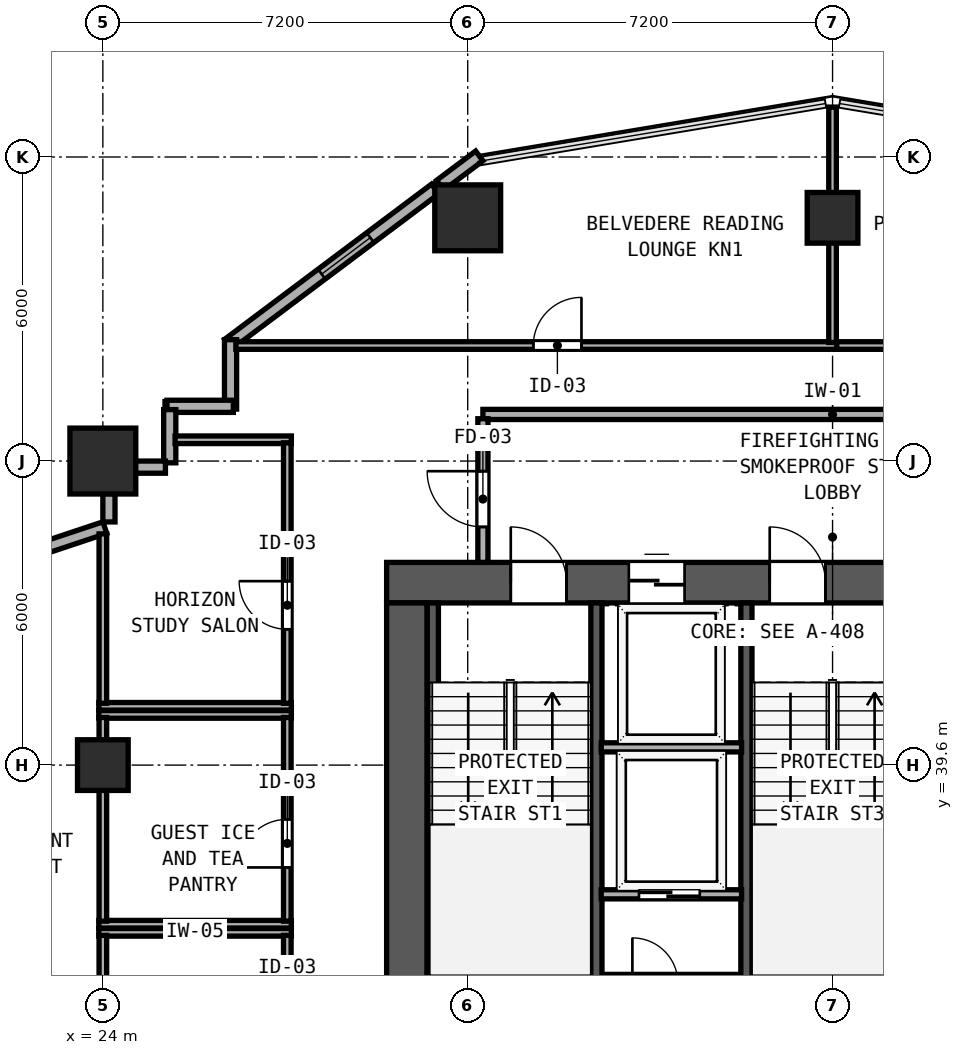
"""IFC4 building model, lengths in metres.
Left out: names, types, materials, properties, quantities, classifications, styles, units other than length and angle.
Written with IfcOpenShell. Run it as: python <this file> out.ifc"""

import sys

from ifc_helpers import new_model, si_unit, direction, frame, frame_2d, origin, origin_2d, place, context, subcontext, project, spatial, rectangle, hollow_rectangle, extrude, element, fill, save


model = new_model("IFC4")
c1 = context("Model", 3, precision=1e-05, world=origin(), true_north=direction((0.0, 1.0)))
c2 = subcontext(c1, "Body", "Model", "MODEL_VIEW")
j1 = project(units=[si_unit("LENGTHUNIT", "METRE"), si_unit("PLANEANGLEUNIT", "RADIAN")], contexts=[c1])
p1 = place(None, origin())
s1 = spatial("IfcSite", under=j1, at=p1, CompositionType="ELEMENT")
p2 = place(p1, origin())
s2 = spatial("IfcBuilding", under=s1, at=p2, CompositionType="ELEMENT")
p3 = place(p2, frame((0.0, 0.0, 31.6)))
s3 = spatial("IfcBuildingStorey", under=s2, at=p3, CompositionType="ELEMENT", Elevation=31.6)
p4 = place(p3, frame((29.6, 43.2, 0.0), z_axis=(0.0, 0.0, 1.0), x_axis=(1.0, 0.0, 0.0)))
e1 = element("IfcWall", 1, at=p4, inside=s3, PredefinedType="SHEAR", context=c2, shape_type="SweptSolid", body=[
    extrude(rectangle(XDim=17.6, YDim=0.8, at=frame_2d((8.8, 0.0))), origin(), (0.0, 0.0, 1.0), 3.6),
])
p5 = place(p4, frame((2.45, 0.0, 0.0)))
e2 = element("IfcOpeningElement", 2, at=p5, cuts=e1, PredefinedType="OPENING", context=c2, shape_type="SweptSolid", body=[
    extrude(rectangle(XDim=1.1, YDim=2.15, at=frame_2d((0.55, 1.075))), frame((0.0, 0.41, 0.0), z_axis=(0.0, -1.0, 0.0), x_axis=(1.0, 0.0, 0.0)), (0.0, 0.0, 1.0), 0.82),
])
p6 = place(p4, frame((7.56, 0.0, 0.0)))
e3 = element("IfcOpeningElement", 3, at=p6, cuts=e1, PredefinedType="OPENING", context=c2, shape_type="SweptSolid", body=[
    extrude(rectangle(XDim=1.1, YDim=2.15, at=frame_2d((0.55, 1.075))), frame((0.0, 0.41, 0.0), z_axis=(0.0, -1.0, 0.0), x_axis=(1.0, 0.0, 0.0)), (0.0, 0.0, 1.0), 0.82),
])
p7 = place(p4, frame((13.65, 0.0, 0.0)))
e4 = element("IfcOpeningElement", 4, at=p7, cuts=e1, PredefinedType="OPENING", context=c2, shape_type="SweptSolid", body=[
    extrude(rectangle(XDim=1.1, YDim=2.15, at=frame_2d((0.55, 1.075))), frame((0.0, 0.41, 0.0), z_axis=(0.0, -1.0, 0.0), x_axis=(1.0, 0.0, 0.0)), (0.0, 0.0, 1.0), 0.82),
])
p8 = place(p4, frame((4.78, 0.0, 0.0)))
e5 = element("IfcOpeningElement", 5, at=p8, cuts=e1, PredefinedType="OPENING", context=c2, shape_type="SweptSolid", body=[
    extrude(rectangle(XDim=1.1, YDim=2.2, at=frame_2d((0.55, 1.1))), frame((0.0, 0.41, 0.0), z_axis=(0.0, -1.0, 0.0), x_axis=(1.0, 0.0, 0.0)), (0.0, 0.0, 1.0), 0.82),
])
p9 = place(p4, frame((11.14, 0.0, 0.0)))
e6 = element("IfcOpeningElement", 6, at=p9, cuts=e1, PredefinedType="OPENING", context=c2, shape_type="SweptSolid", body=[
    extrude(rectangle(XDim=1.1, YDim=2.2, at=frame_2d((0.55, 1.1))), frame((0.0, 0.41, 0.0), z_axis=(0.0, -1.0, 0.0), x_axis=(1.0, 0.0, 0.0)), (0.0, 0.0, 1.0), 0.82),
])
p10 = place(p3, frame((30.0, 32.8, 0.0), z_axis=(0.0, 0.0, 1.0), x_axis=(0.0, 1.0, 0.0)))
e7 = element("IfcWall", 7, at=p10, inside=s3, PredefinedType="SHEAR", context=c2, shape_type="SweptSolid", body=[
    extrude(rectangle(XDim=10.0, YDim=0.8, at=frame_2d((5.0, 0.0))), origin(), (0.0, 0.0, 1.0), 3.6),
])
p11 = place(p3, frame((30.4, 35.29, 0.0), z_axis=(0.0, 0.0, 1.0), x_axis=(1.0, 0.0, 0.0)))
e8 = element("IfcWall", 8, at=p11, inside=s3, PredefinedType="SHEAR", context=c2, shape_type="SweptSolid", body=[
    extrude(rectangle(XDim=16.0, YDim=0.36, at=frame_2d((8.0, 0.0))), origin(), (0.0, 0.0, 1.0), 3.6),
])
p12 = place(p11, frame((4.95, 0.0, 0.0), z_axis=(0.0, 0.0, 1.0), x_axis=(-1.0, 0.0, 0.0)))
e9 = element("IfcOpeningElement", 9, at=p12, cuts=e8, PredefinedType="OPENING", context=c2, shape_type="SweptSolid", body=[
    extrude(rectangle(XDim=0.9, YDim=2.1, at=frame_2d((0.45, 1.05))), frame((0.0, 0.19, 0.0), z_axis=(0.0, -1.0, 0.0), x_axis=(1.0, 0.0, 0.0)), (0.0, 0.0, 1.0), 0.38),
])
p13 = place(p11, frame((12.01, 0.0, 0.0), z_axis=(0.0, 0.0, 1.0), x_axis=(-1.0, 0.0, 0.0)))
e10 = element("IfcOpeningElement", 10, at=p13, cuts=e8, PredefinedType="OPENING", context=c2, shape_type="SweptSolid", body=[
    extrude(rectangle(XDim=0.9, YDim=2.1, at=frame_2d((0.45, 1.05))), frame((0.0, 0.19, 0.0), z_axis=(0.0, -1.0, 0.0), x_axis=(1.0, 0.0, 0.0)), (0.0, 0.0, 1.0), 0.38),
])
for number, where, z_axis, x_axis in (
    (11, (30.512, 35.39, 0.0), (0.0, 0.0, 1.0), (0.0, 1.0, 0.0)),
    (12, (33.74, 35.39, 0.0), (0.0, 0.0, 1.0), (0.0, 1.0, 0.0)),
    (13, (36.7, 35.39, 0.0), (0.0, 0.0, 1.0), (0.0, 1.0, 0.0)),
):
    element("IfcWall", number, at=place(p3, frame(where, z_axis=z_axis, x_axis=x_axis)), inside=s3, PredefinedType="SHEAR", context=c2, shape_type="SweptSolid", body=[
        extrude(rectangle(XDim=7.41, YDim=0.22, at=frame_2d((3.705, 0.0))), origin(), (0.0, 0.0, 1.0), 3.6),
    ])
for number, where, z_axis, x_axis in (
    (14, (24.0, 45.6, 0.0), (0.0, 0.0, 1.0), (1.0, 0.0, 0.0)),
    (15, (31.2, 50.4, 0.0), (0.0, 0.0, 1.0), (1.0, 0.0, 0.0)),
):
    element("IfcColumn", number, at=place(p3, frame(where, z_axis=z_axis, x_axis=x_axis)), inside=s3, PredefinedType="COLUMN", context=c2, shape_type="SweptSolid", body=[
        extrude(hollow_rectangle(XDim=1.3, YDim=1.3, WallThickness=0.048, at=origin_2d()), origin(), (0.0, 0.0, 1.0), 3.8),
    ])
for number, where, z_axis, x_axis in (
    (16, (24.0, 39.6, 0.0), (0.0, 0.0, 1.0), (1.0, 0.0, 0.0)),
    (17, (38.4, 50.4, 0.0), (0.0, 0.0, 1.0), (1.0, 0.0, 0.0)),
):
    element("IfcColumn", number, at=place(p3, frame(where, z_axis=z_axis, x_axis=x_axis)), inside=s3, PredefinedType="COLUMN", context=c2, shape_type="SweptSolid", body=[
        extrude(hollow_rectangle(XDim=1.0, YDim=1.0, WallThickness=0.038, at=origin_2d()), origin(), (0.0, 0.0, 1.0), 3.8),
    ])
p14 = place(p3, frame((31.429, 51.621, 0.0), z_axis=(0.0, 0.0, 1.0), x_axis=(-0.800090996409, -0.599878652284, 0.0)))
e18 = element("IfcWall", 18, at=p14, inside=s3, PredefinedType="SOLIDWALL", context=c2, shape_type="SweptSolid", body=[
    extrude(rectangle(XDim=0.966, YDim=0.24, at=frame_2d((0.483, 0.0))), origin(), (0.0, 0.0, 1.0), 3.6),
])
p15 = place(p3, frame((30.558, 50.969, 0.0), z_axis=(0.0, 0.0, 1.0), x_axis=(-0.8, -0.6, 0.0)))
e19 = element("IfcWall", 19, at=p15, inside=s3, PredefinedType="SOLIDWALL", context=c2, shape_type="SweptSolid", body=[
    extrude(rectangle(XDim=5.103, YDim=0.24, at=frame_2d((2.551, 0.0))), origin(), (0.0, 0.0, 1.0), 3.6),
])
p16 = place(p15, frame((1.6, 0.0, 0.85)))
e20 = element("IfcOpeningElement", 20, at=p16, cuts=e19, PredefinedType="OPENING", context=c2, shape_type="SweptSolid", body=[
    extrude(rectangle(XDim=1.2, YDim=1.85, at=frame_2d((0.6, 0.925))), frame((0.0, 0.13, 0.0), z_axis=(0.0, -1.0, 0.0), x_axis=(1.0, 0.0, 0.0)), (0.0, 0.0, 1.0), 0.26),
])
p17 = place(p3, frame((26.52, 47.995, 0.0), z_axis=(0.0, 0.0, 1.0), x_axis=(0.0, -1.0, 0.0)))
e21 = element("IfcWall", 21, at=p17, inside=s3, PredefinedType="SOLIDWALL", context=c2, shape_type="SweptSolid", body=[
    extrude(rectangle(XDim=1.37, YDim=0.24, at=frame_2d((0.685, 0.0))), origin(), (0.0, 0.0, 1.0), 3.6),
])
p18 = place(p3, frame((26.575, 46.68, 0.0), z_axis=(0.0, 0.0, 1.0), x_axis=(-1.0, 0.0, 0.0)))
e22 = element("IfcWall", 22, at=p18, inside=s3, PredefinedType="SOLIDWALL", context=c2, shape_type="SweptSolid", body=[
    extrude(rectangle(XDim=1.31, YDim=0.24, at=frame_2d((0.655, 0.0))), origin(), (0.0, 0.0, 1.0), 3.6),
])
p19 = place(p3, frame((25.32, 46.615, 0.0), z_axis=(0.0, 0.0, 1.0), x_axis=(0.0, -1.0, 0.0)))
e23 = element("IfcWall", 23, at=p19, inside=s3, PredefinedType="SOLIDWALL", context=c2, shape_type="SweptSolid", body=[
    extrude(rectangle(XDim=1.05, YDim=0.24, at=frame_2d((0.525, 0.0))), origin(), (0.0, 0.0, 1.0), 3.6),
])
p20 = place(p3, frame((25.235, 45.48, 0.0), z_axis=(0.0, 0.0, 1.0), x_axis=(-1.0, 0.0, 0.0)))
e24 = element("IfcWall", 24, at=p20, inside=s3, PredefinedType="SOLIDWALL", context=c2, shape_type="SweptSolid", body=[
    extrude(rectangle(XDim=0.593, YDim=0.24, at=frame_2d((0.296, 0.0))), origin(), (0.0, 0.0, 1.0), 3.6),
])
p21 = place(p3, frame((24.12, 44.958, 0.0), z_axis=(0.0, 0.0, 1.0), x_axis=(0.0, -1.0, 0.0)))
e25 = element("IfcWall", 25, at=p21, inside=s3, PredefinedType="SOLIDWALL", context=c2, shape_type="SweptSolid", body=[
    extrude(rectangle(XDim=0.56, YDim=0.24, at=frame_2d((0.28, 0.0))), origin(), (0.0, 0.0, 1.0), 3.097),
])
p22 = place(p3, frame((24.039, 44.287, 0.0), z_axis=(0.0, 0.0, 1.0), x_axis=(-0.948678995954, -0.316240672014, 0.0)))
e26 = element("IfcWall", 26, at=p22, inside=s3, PredefinedType="SOLIDWALL", context=c2, shape_type="SweptSolid", body=[
    extrude(rectangle(XDim=5.675, YDim=0.24, at=frame_2d((2.837, 0.0))), origin(), (0.0, 0.0, 1.0), 3.097),
])
p23 = place(p22, frame((1.6, 0.0, 0.85)))
e27 = element("IfcOpeningElement", 27, at=p23, cuts=e26, PredefinedType="OPENING", context=c2, shape_type="SweptSolid", body=[
    extrude(rectangle(XDim=1.2, YDim=1.85, at=frame_2d((0.6, 0.925))), frame((0.0, 0.13, 0.0), z_axis=(0.0, -1.0, 0.0), x_axis=(1.0, 0.0, 0.0)), (0.0, 0.0, 1.0), 0.26),
])
p24 = place(p3, frame((31.5, 46.52, 0.0), z_axis=(0.0, 0.0, 1.0), x_axis=(1.0, 0.0, 0.0)))
e28 = element("IfcWall", 28, at=p24, inside=s3, PredefinedType="SOLIDWALL", context=c2, shape_type="SweptSolid", body=[
    extrude(rectangle(XDim=13.8, YDim=0.2, at=frame_2d((6.9, 0.0))), origin(), (0.0, 0.0, 1.0), 3.6),
])
p25 = place(p3, frame((31.5, 43.6, 0.0), z_axis=(0.0, 0.0, 1.0), x_axis=(0.0, 1.0, 0.0)))
e29 = element("IfcWall", 29, at=p25, inside=s3, PredefinedType="SOLIDWALL", context=c2, shape_type="SweptSolid", body=[
    extrude(rectangle(XDim=2.835, YDim=0.2, at=frame_2d((1.417, 0.0))), origin(), (0.0, 0.0, 1.0), 3.6),
])
p26 = place(p25, frame((1.8, 0.0, 0.0), z_axis=(0.0, 0.0, 1.0), x_axis=(-1.0, 0.0, 0.0)))
e30 = element("IfcOpeningElement", 30, at=p26, cuts=e29, PredefinedType="OPENING", context=c2, shape_type="SweptSolid", body=[
    extrude(rectangle(XDim=1.1, YDim=2.15, at=frame_2d((0.55, 1.075))), frame((0.0, 0.11, 0.0), z_axis=(0.0, -1.0, 0.0), x_axis=(1.0, 0.0, 0.0)), (0.0, 0.0, 1.0), 0.22),
])
p27 = place(p3, frame((33.835, 39.95, 0.0), z_axis=(0.0, 0.0, 1.0), x_axis=(1.0, 0.0, 0.0)))
e31 = element("IfcWall", 31, at=p27, inside=s3, PredefinedType="SOLIDWALL", context=c2, shape_type="SweptSolid", body=[
    extrude(rectangle(XDim=2.77, YDim=0.18, at=frame_2d((1.385, 0.0))), origin(), (0.0, 0.0, 1.0), 3.6),
])
p28 = place(p3, frame((33.835, 37.05, 0.0), z_axis=(0.0, 0.0, 1.0), x_axis=(1.0, 0.0, 0.0)))
e32 = element("IfcWall", 32, at=p28, inside=s3, PredefinedType="SOLIDWALL", context=c2, shape_type="SweptSolid", body=[
    extrude(rectangle(XDim=2.77, YDim=0.18, at=frame_2d((1.385, 0.0))), origin(), (0.0, 0.0, 1.0), 3.6),
])
p29 = place(p28, frame((1.945, 0.0, 0.0), z_axis=(0.0, 0.0, 1.0), x_axis=(-1.0, 0.0, 0.0)))
e33 = element("IfcOpeningElement", 33, at=p29, cuts=e32, PredefinedType="OPENING", context=c2, shape_type="SweptSolid", body=[
    extrude(rectangle(XDim=1.2, YDim=2.2, at=frame_2d((0.6, 1.1))), frame((0.0, 0.1, 0.0), z_axis=(0.0, -1.0, 0.0), x_axis=(1.0, 0.0, 0.0)), (0.0, 0.0, 1.0), 0.2),
])
p30 = place(p3, frame((23.92, 36.3, 0.0), z_axis=(0.0, 0.0, 1.0), x_axis=(1.0, 0.0, 0.0)))
e34 = element("IfcWall", 34, at=p30, inside=s3, PredefinedType="PARTITIONING", context=c2, shape_type="SweptSolid", body=[
    extrude(rectangle(XDim=3.8, YDim=0.15, at=frame_2d((1.9, 0.0))), origin(), (0.0, 0.0, 1.0), 3.6),
])
p31 = place(p3, frame((24.0, 33.06, 0.0), z_axis=(0.0, 0.0, 1.0), x_axis=(0.0, 1.0, 0.0)))
e35 = element("IfcWall", 35, at=p31, inside=s3, PredefinedType="PARTITIONING", context=c2, shape_type="SweptSolid", body=[
    extrude(rectangle(XDim=3.18, YDim=0.15, at=frame_2d((1.59, 0.0))), origin(), (0.0, 0.0, 1.0), 3.097),
])
p32 = place(p3, frame((27.64, 33.06, 0.0), z_axis=(0.0, 0.0, 1.0), x_axis=(0.0, 1.0, 0.0)))
e36 = element("IfcWall", 36, at=p32, inside=s3, PredefinedType="PARTITIONING", context=c2, shape_type="SweptSolid", body=[
    extrude(rectangle(XDim=3.18, YDim=0.15, at=frame_2d((1.59, 0.0))), origin(), (0.0, 0.0, 1.0), 3.6),
])
p33 = place(p32, frame((1.81, 0.0, 0.0), z_axis=(0.0, 0.0, 1.0), x_axis=(-1.0, 0.0, 0.0)))
e37 = element("IfcOpeningElement", 37, at=p33, cuts=e36, PredefinedType="OPENING", context=c2, shape_type="SweptSolid", body=[
    extrude(rectangle(XDim=0.95, YDim=2.12, at=frame_2d((0.475, 1.06))), frame((0.0, 0.085, 0.0), z_axis=(0.0, -1.0, 0.0), x_axis=(1.0, 0.0, 0.0)), (0.0, 0.0, 1.0), 0.17),
])
for number, where, z_axis, x_axis in (
    (38, (23.92, 40.6, 0.0), (0.0, 0.0, 1.0), (1.0, 0.0, 0.0)),
    (39, (23.92, 36.46, 0.0), (0.0, 0.0, 1.0), (1.0, 0.0, 0.0)),
):
    element("IfcWall", number, at=place(p3, frame(where, z_axis=z_axis, x_axis=x_axis)), inside=s3, PredefinedType="PARTITIONING", context=c2, shape_type="SweptSolid", body=[
        extrude(rectangle(XDim=3.8, YDim=0.15, at=frame_2d((1.9, 0.0))), origin(), (0.0, 0.0, 1.0), 3.6),
    ])
p34 = place(p3, frame((24.0, 36.52, 0.0), z_axis=(0.0, 0.0, 1.0), x_axis=(0.0, 1.0, 0.0)))
e40 = element("IfcWall", 40, at=p34, inside=s3, PredefinedType="PARTITIONING", context=c2, shape_type="SweptSolid", body=[
    extrude(rectangle(XDim=4.02, YDim=0.15, at=frame_2d((2.01, 0.0))), origin(), (0.0, 0.0, 1.0), 3.097),
])
p35 = place(p3, frame((27.64, 36.52, 0.0), z_axis=(0.0, 0.0, 1.0), x_axis=(0.0, 1.0, 0.0)))
e41 = element("IfcWall", 41, at=p35, inside=s3, PredefinedType="PARTITIONING", context=c2, shape_type="SweptSolid", body=[
    extrude(rectangle(XDim=4.02, YDim=0.15, at=frame_2d((2.01, 0.0))), origin(), (0.0, 0.0, 1.0), 3.6),
])
p36 = place(p35, frame((2.01, 0.0, 0.0), z_axis=(0.0, 0.0, 1.0), x_axis=(-1.0, 0.0, 0.0)))
e42 = element("IfcOpeningElement", 42, at=p36, cuts=e41, PredefinedType="OPENING", context=c2, shape_type="SweptSolid", body=[
    extrude(rectangle(XDim=0.95, YDim=2.12, at=frame_2d((0.475, 1.06))), frame((0.0, 0.085, 0.0), z_axis=(0.0, -1.0, 0.0), x_axis=(1.0, 0.0, 0.0)), (0.0, 0.0, 1.0), 0.17),
])
p37 = place(p3, frame((25.425, 46.02, 0.0), z_axis=(0.0, 0.0, 1.0), x_axis=(1.0, 0.0, 0.0)))
e43 = element("IfcWall", 43, at=p37, inside=s3, PredefinedType="PARTITIONING", context=c2, shape_type="SweptSolid", body=[
    extrude(rectangle(XDim=2.295, YDim=0.15, at=frame_2d((1.147, 0.0))), origin(), (0.0, 0.0, 1.0), 3.6),
])
p38 = place(p3, frame((23.92, 40.76, 0.0), z_axis=(0.0, 0.0, 1.0), x_axis=(1.0, 0.0, 0.0)))
e44 = element("IfcWall", 44, at=p38, inside=s3, PredefinedType="PARTITIONING", context=c2, shape_type="SweptSolid", body=[
    extrude(rectangle(XDim=3.8, YDim=0.15, at=frame_2d((1.9, 0.0))), origin(), (0.0, 0.0, 1.0), 3.6),
])
p39 = place(p3, frame((24.0, 40.82, 0.0), z_axis=(0.0, 0.0, 1.0), x_axis=(0.0, 1.0, 0.0)))
e45 = element("IfcWall", 45, at=p39, inside=s3, PredefinedType="PARTITIONING", context=c2, shape_type="SweptSolid", body=[
    extrude(rectangle(XDim=3.343, YDim=0.15, at=frame_2d((1.671, 0.0))), origin(), (0.0, 0.0, 1.0), 3.097),
])
p40 = place(p3, frame((27.64, 40.82, 0.0), z_axis=(0.0, 0.0, 1.0), x_axis=(0.0, 1.0, 0.0)))
e46 = element("IfcWall", 46, at=p40, inside=s3, PredefinedType="PARTITIONING", context=c2, shape_type="SweptSolid", body=[
    extrude(rectangle(XDim=5.14, YDim=0.15, at=frame_2d((2.57, 0.0))), origin(), (0.0, 0.0, 1.0), 3.6),
])
p41 = place(p40, frame((2.41, 0.0, 0.0), z_axis=(0.0, 0.0, 1.0), x_axis=(-1.0, 0.0, 0.0)))
e47 = element("IfcOpeningElement", 47, at=p41, cuts=e46, PredefinedType="OPENING", context=c2, shape_type="SweptSolid", body=[
    extrude(rectangle(XDim=0.95, YDim=2.12, at=frame_2d((0.475, 1.06))), frame((0.0, 0.085, 0.0), z_axis=(0.0, -1.0, 0.0), x_axis=(1.0, 0.0, 0.0)), (0.0, 0.0, 1.0), 0.17),
])
p42 = place(p3, frame((26.625, 47.88, 0.0), z_axis=(0.0, 0.0, 1.0), x_axis=(1.0, 0.0, 0.0)))
e48 = element("IfcWall", 48, at=p42, inside=s3, PredefinedType="PARTITIONING", context=c2, shape_type="SweptSolid", body=[
    extrude(rectangle(XDim=11.855, YDim=0.15, at=frame_2d((5.927, 0.0))), origin(), (0.0, 0.0, 1.0), 3.6),
])
p43 = place(p42, frame((5.87, 0.0, 0.0)))
e49 = element("IfcOpeningElement", 49, at=p43, cuts=e48, PredefinedType="OPENING", context=c2, shape_type="SweptSolid", body=[
    extrude(rectangle(XDim=0.95, YDim=2.12, at=frame_2d((0.475, 1.06))), frame((0.0, 0.085, 0.0), z_axis=(0.0, -1.0, 0.0), x_axis=(1.0, 0.0, 0.0)), (0.0, 0.0, 1.0), 0.17),
])
p44 = place(p3, frame((38.4, 47.94, 0.0), z_axis=(0.0, 0.0, 1.0), x_axis=(0.0, 1.0, 0.0)))
e50 = element("IfcWall", 50, at=p44, inside=s3, PredefinedType="PARTITIONING", context=c2, shape_type="SweptSolid", body=[
    extrude(rectangle(XDim=4.645, YDim=0.15, at=frame_2d((2.323, 0.0))), origin(), (0.0, 0.0, 1.0), 3.6),
])
p45 = place(p3, frame((38.482, 47.88, 0.0), z_axis=(0.0, 0.0, 1.0), x_axis=(1.0, 0.0, 0.0)))
e51 = element("IfcWall", 51, at=p45, inside=s3, PredefinedType="PARTITIONING", context=c2, shape_type="SweptSolid", body=[
    extrude(rectangle(XDim=11.693, YDim=0.15, at=frame_2d((5.847, 0.0))), origin(), (0.0, 0.0, 1.0), 3.6),
])
p46 = place(p45, frame((4.793, 0.0, 0.0)))
e52 = element("IfcOpeningElement", 52, at=p46, cuts=e51, PredefinedType="OPENING", context=c2, shape_type="SweptSolid", body=[
    extrude(rectangle(XDim=0.95, YDim=2.12, at=frame_2d((0.475, 1.06))), frame((0.0, 0.085, 0.0), z_axis=(0.0, -1.0, 0.0), x_axis=(1.0, 0.0, 0.0)), (0.0, 0.0, 1.0), 0.17),
])
p47 = place(p16, origin())
e53 = element("IfcWindow", 53, at=p47, inside=s3, PartitioningType="SINGLE_PANEL", PredefinedType="WINDOW", context=c2, shape_type="SweptSolid", body=[
    extrude(rectangle(XDim=1.2, YDim=1.85, at=frame_2d((0.6, 0.925))), frame((0.0, 0.03, 0.0), z_axis=(0.0, -1.0, 0.0), x_axis=(1.0, 0.0, 0.0)), (0.0, 0.0, 1.0), 0.06),
])
fill(e20, e53)
p48 = place(p5, origin())
e54 = element("IfcDoor", 54, at=p48, inside=s3, OperationType="SINGLE_SWING_LEFT", PredefinedType="DOOR", context=c2, shape_type="SweptSolid", body=[
    extrude(rectangle(XDim=1.1, YDim=2.15, at=frame_2d((0.55, 1.075))), frame((0.0, 0.185, 0.0), z_axis=(0.0, -1.0, 0.0), x_axis=(1.0, 0.0, 0.0)), (0.0, 0.0, 1.0), 0.05),
])
fill(e2, e54)
p49 = place(p6, origin())
e55 = element("IfcDoor", 55, at=p49, inside=s3, OperationType="SINGLE_SWING_LEFT", PredefinedType="DOOR", context=c2, shape_type="SweptSolid", body=[
    extrude(rectangle(XDim=1.1, YDim=2.15, at=frame_2d((0.55, 1.075))), frame((0.0, 0.185, 0.0), z_axis=(0.0, -1.0, 0.0), x_axis=(1.0, 0.0, 0.0)), (0.0, 0.0, 1.0), 0.05),
])
fill(e3, e55)
p50 = place(p26, origin())
e56 = element("IfcDoor", 56, at=p50, inside=s3, OperationType="SINGLE_SWING_LEFT", PredefinedType="DOOR", context=c2, shape_type="SweptSolid", body=[
    extrude(rectangle(XDim=1.1, YDim=2.15, at=frame_2d((0.55, 1.075))), frame((0.0, 0.025, 0.0), z_axis=(0.0, -1.0, 0.0), x_axis=(1.0, 0.0, 0.0)), (0.0, 0.0, 1.0), 0.05),
])
fill(e30, e56)
p51 = place(p8, origin())
e57 = element("IfcDoor", 57, at=p51, inside=s3, OperationType="SLIDING_TO_LEFT", PredefinedType="DOOR", context=c2, shape_type="SweptSolid", body=[
    extrude(rectangle(XDim=1.1, YDim=2.2, at=frame_2d((0.55, 1.1))), frame((0.0, 0.185, 0.0), z_axis=(0.0, -1.0, 0.0), x_axis=(1.0, 0.0, 0.0)), (0.0, 0.0, 1.0), 0.05),
])
fill(e5, e57)
p52 = place(p29, origin())
e58 = element("IfcDoor", 58, at=p52, inside=s3, OperationType="SLIDING_TO_RIGHT", PredefinedType="DOOR", context=c2, shape_type="SweptSolid", body=[
    extrude(rectangle(XDim=1.2, YDim=2.2, at=frame_2d((0.6, 1.1))), frame((0.0, 0.025, 0.0), z_axis=(0.0, -1.0, 0.0), x_axis=(1.0, 0.0, 0.0)), (0.0, 0.0, 1.0), 0.05),
])
fill(e33, e58)
p53 = place(p36, origin())
e59 = element("IfcDoor", 59, at=p53, inside=s3, OperationType="SINGLE_SWING_RIGHT", PredefinedType="DOOR", context=c2, shape_type="SweptSolid", body=[
    extrude(rectangle(XDim=0.95, YDim=2.12, at=frame_2d((0.475, 1.06))), frame((0.0, 0.025, 0.0), z_axis=(0.0, -1.0, 0.0), x_axis=(1.0, 0.0, 0.0)), (0.0, 0.0, 1.0), 0.05),
])
fill(e42, e59)
p54 = place(p41, origin())
e60 = element("IfcDoor", 60, at=p54, inside=s3, OperationType="SINGLE_SWING_LEFT", PredefinedType="DOOR", context=c2, shape_type="SweptSolid", body=[
    extrude(rectangle(XDim=0.95, YDim=2.12, at=frame_2d((0.475, 1.06))), frame((0.0, 0.025, 0.0), z_axis=(0.0, -1.0, 0.0), x_axis=(1.0, 0.0, 0.0)), (0.0, 0.0, 1.0), 0.05),
])
fill(e47, e60)
p55 = place(p43, origin())
e61 = element("IfcDoor", 61, at=p55, inside=s3, OperationType="SINGLE_SWING_RIGHT", PredefinedType="DOOR", context=c2, shape_type="SweptSolid", body=[
    extrude(rectangle(XDim=0.95, YDim=2.12, at=frame_2d((0.475, 1.06))), frame((0.0, 0.025, 0.0), z_axis=(0.0, -1.0, 0.0), x_axis=(1.0, 0.0, 0.0)), (0.0, 0.0, 1.0), 0.05),
])
fill(e49, e61)
save(model, sys.argv[1])
